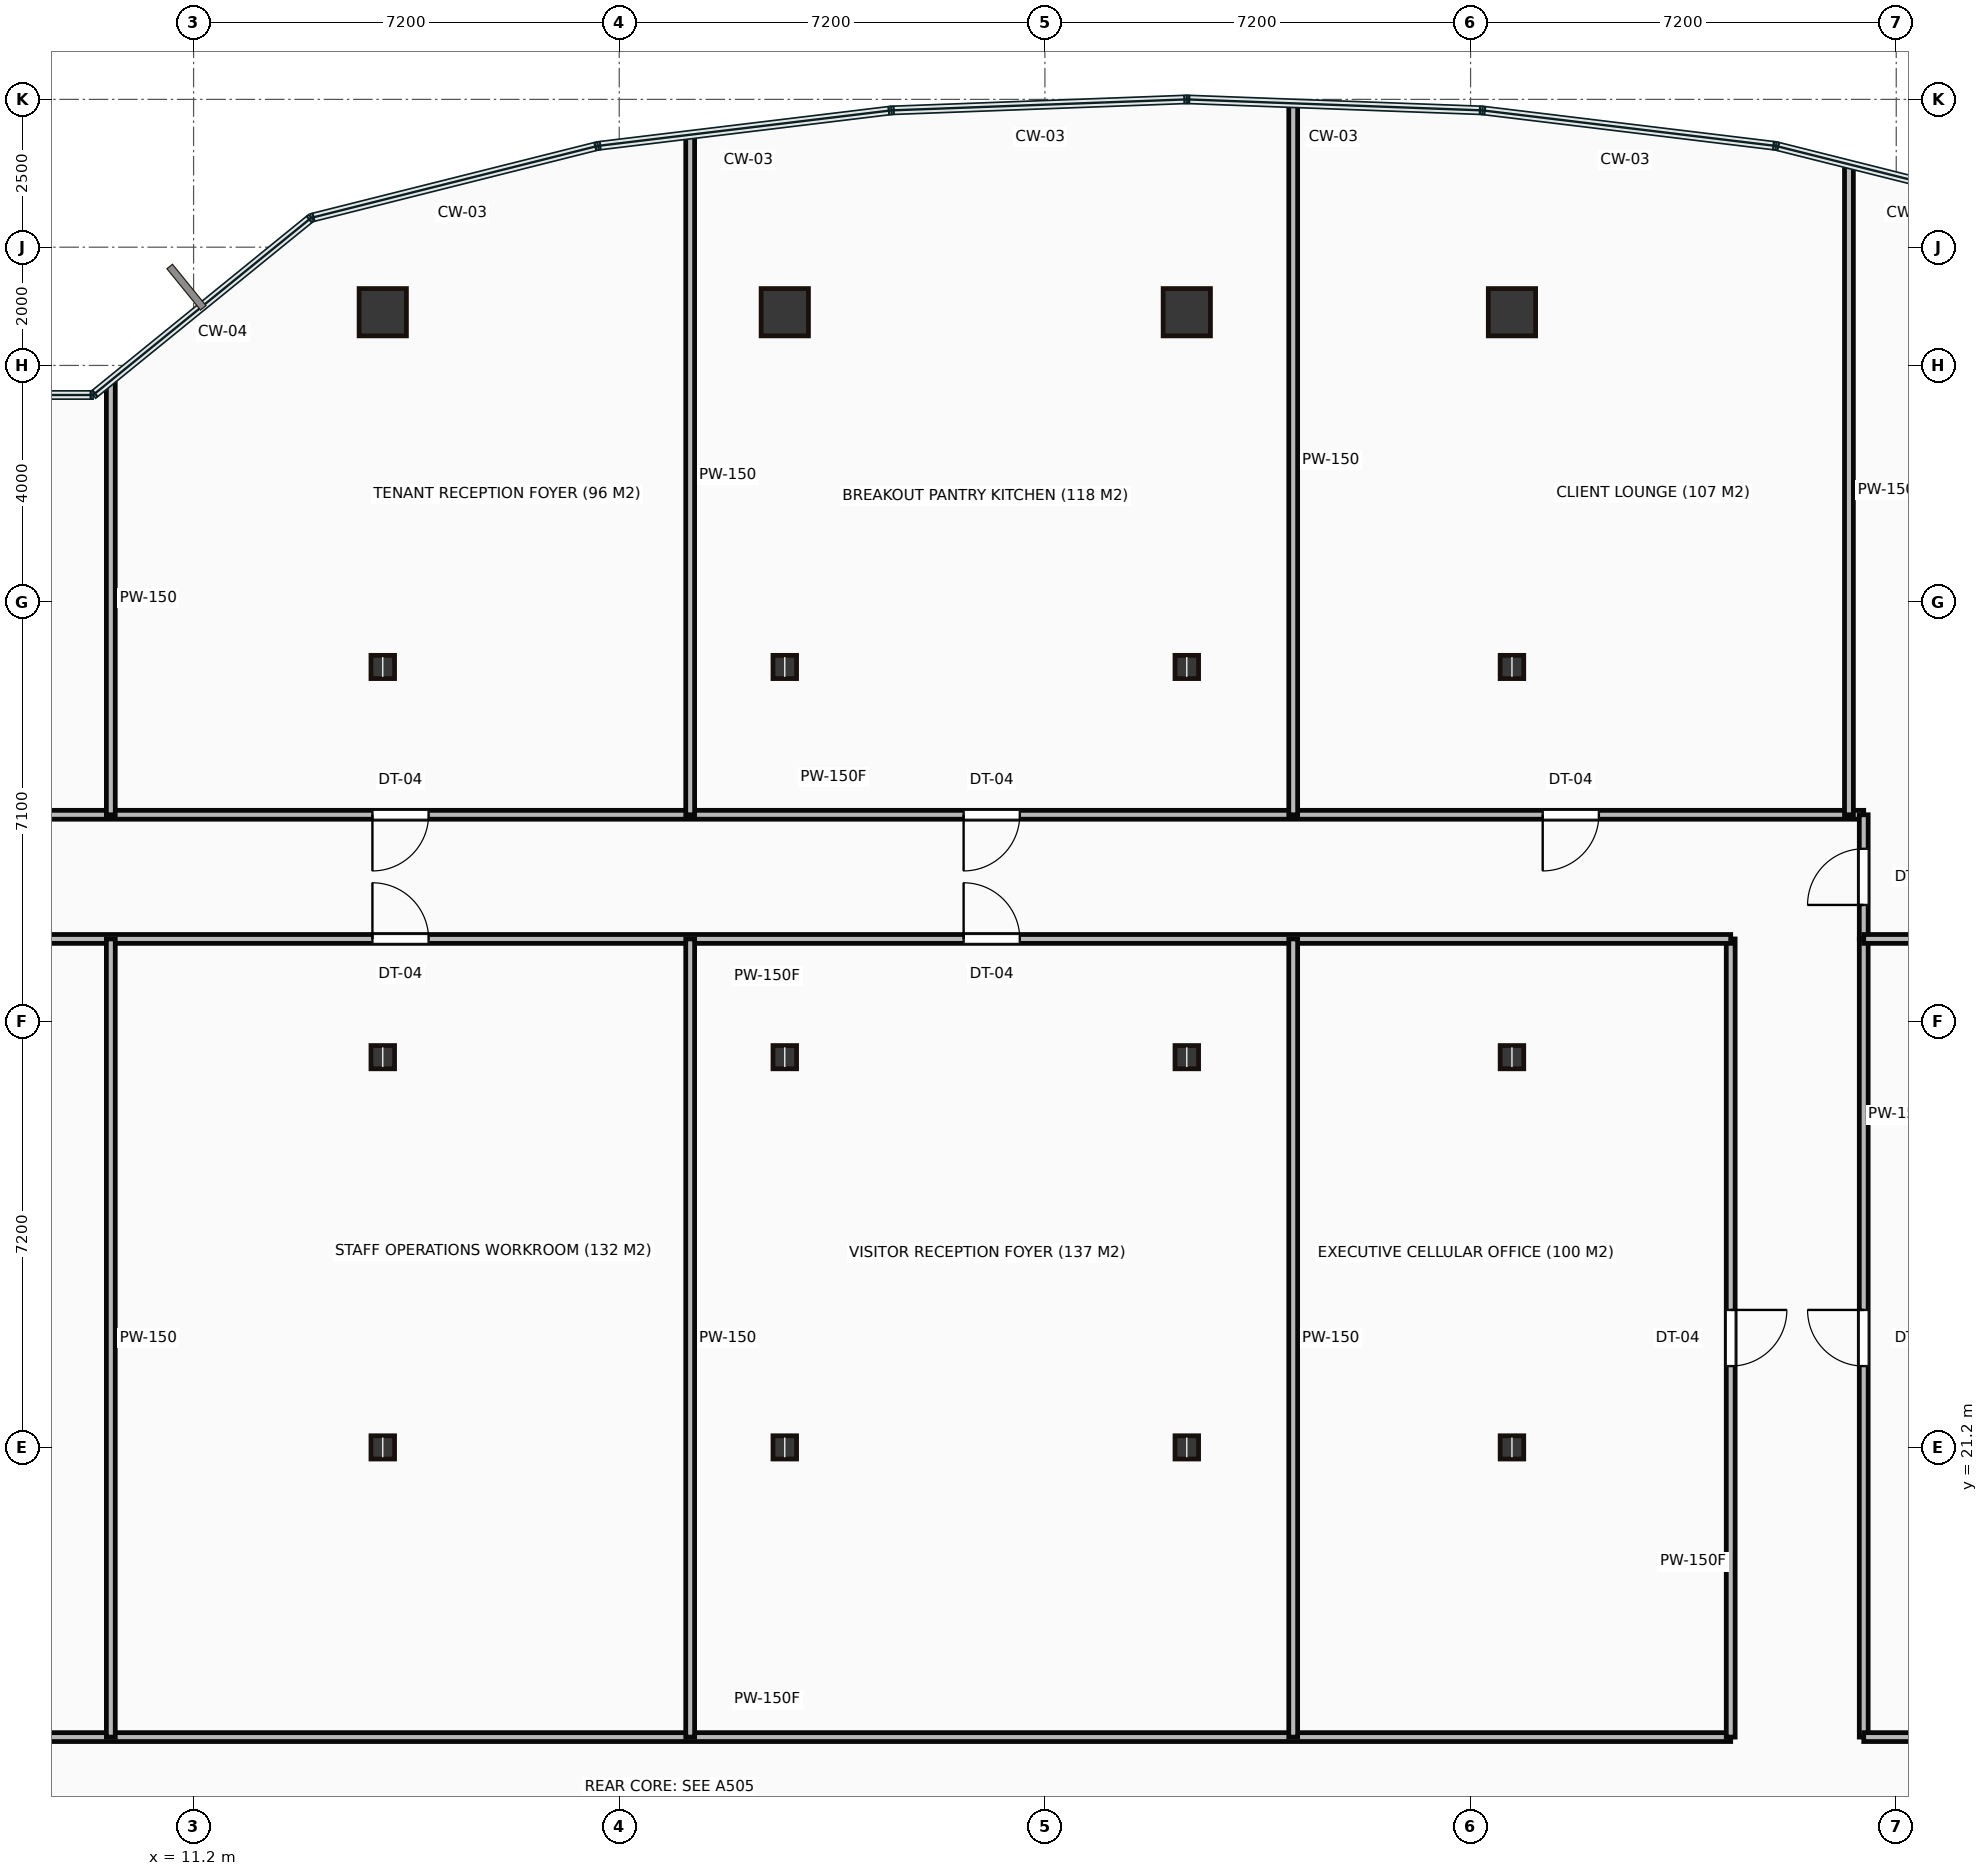
"""IFC4 building model, lengths in metres.
Left out: names, types, materials, properties, quantities, classifications, styles, units other than length and angle.
Written with IfcOpenShell. Run it as: python <this file> out.ifc"""

import sys

from ifc_helpers import new_model, si_unit, direction, frame, frame_2d, origin, origin_2d, place, context, subcontext, project, spatial, rectangle, hollow_rectangle, i_section, extrude, source, transform, mapped, element, fill, save


model = new_model("IFC4")
c1 = context("Model", 3, precision=1e-05, world=origin(), true_north=direction((0.0, 1.0)))
c2 = subcontext(c1, "Body", "Model", "MODEL_VIEW")
j1 = project(units=[si_unit("LENGTHUNIT", "METRE"), si_unit("PLANEANGLEUNIT", "RADIAN")], contexts=[c1])
p1 = place(None, origin())
s1 = spatial("IfcSite", under=j1, at=p1, CompositionType="ELEMENT")
p2 = place(p1, origin())
s2 = spatial("IfcBuilding", under=s1, at=p2, CompositionType="ELEMENT")
p3 = place(p2, frame((0.0, 0.0, 103.25)))
s3 = spatial("IfcBuildingStorey", under=s2, at=p3, CompositionType="ELEMENT", Elevation=103.25)
m1 = source(origin(), c2, "Body", "SweptSolid", [
    extrude(i_section(OverallWidth=0.399, OverallDepth=0.393, WebThickness=0.023, FlangeThickness=0.037, at=origin_2d()), origin(), (0.0, 0.0, 1.0), 3.65),
])
for number, where, z_axis, x_axis in (
    (1, (14.4, 21.2, 0.0), (0.0, 0.0, 1.0), (1.0, 0.0, 0.0)),
    (2, (14.4, 27.8, 0.0), (0.0, 0.0, 1.0), (1.0, 0.0, 0.0)),
    (3, (14.4, 34.4, 0.0), (0.0, 0.0, 1.0), (1.0, 0.0, 0.0)),
):
    element("IfcColumn", number, at=place(p3, frame(where, z_axis=z_axis, x_axis=x_axis)), inside=s3, PredefinedType="COLUMN", context=c2, shape_type="MappedRepresentation", body=[
        mapped(m1, transform((0.0, 0.0, 0.0))),
    ])
m2 = source(origin(), c2, "Body", "SweptSolid", [
    extrude(hollow_rectangle(XDim=0.8, YDim=0.8, WallThickness=0.04, at=origin_2d()), origin(), (0.0, 0.0, 1.0), 3.65),
])
p4 = place(p3, frame((14.4, 40.4, 0.0), z_axis=(0.0, 0.0, 1.0), x_axis=(1.0, 0.0, 0.0)))
e4 = element("IfcColumn", 4, at=p4, inside=s3, PredefinedType="COLUMN", context=c2, shape_type="MappedRepresentation", body=[
    mapped(m2, transform((0.0, 0.0, 0.0))),
])
for number, where, z_axis, x_axis in (
    (5, (21.2, 21.2, 0.0), (0.0, 0.0, 1.0), (1.0, 0.0, 0.0)),
    (6, (21.2, 27.8, 0.0), (0.0, 0.0, 1.0), (1.0, 0.0, 0.0)),
    (7, (21.2, 34.4, 0.0), (0.0, 0.0, 1.0), (1.0, 0.0, 0.0)),
):
    element("IfcColumn", number, at=place(p3, frame(where, z_axis=z_axis, x_axis=x_axis)), inside=s3, PredefinedType="COLUMN", context=c2, shape_type="MappedRepresentation", body=[
        mapped(m1, transform((0.0, 0.0, 0.0))),
    ])
p5 = place(p3, frame((21.2, 40.4, 0.0), z_axis=(0.0, 0.0, 1.0), x_axis=(1.0, 0.0, 0.0)))
e8 = element("IfcColumn", 8, at=p5, inside=s3, PredefinedType="COLUMN", context=c2, shape_type="MappedRepresentation", body=[
    mapped(m2, transform((0.0, 0.0, 0.0))),
])
for number, where, z_axis, x_axis in (
    (9, (28.0, 21.2, 0.0), (0.0, 0.0, 1.0), (1.0, 0.0, 0.0)),
    (10, (28.0, 27.8, 0.0), (0.0, 0.0, 1.0), (1.0, 0.0, 0.0)),
    (11, (28.0, 34.4, 0.0), (0.0, 0.0, 1.0), (1.0, 0.0, 0.0)),
):
    element("IfcColumn", number, at=place(p3, frame(where, z_axis=z_axis, x_axis=x_axis)), inside=s3, PredefinedType="COLUMN", context=c2, shape_type="MappedRepresentation", body=[
        mapped(m1, transform((0.0, 0.0, 0.0))),
    ])
p6 = place(p3, frame((28.0, 40.4, 0.0), z_axis=(0.0, 0.0, 1.0), x_axis=(1.0, 0.0, 0.0)))
e12 = element("IfcColumn", 12, at=p6, inside=s3, PredefinedType="COLUMN", context=c2, shape_type="MappedRepresentation", body=[
    mapped(m2, transform((0.0, 0.0, 0.0))),
])
for number, where, z_axis, x_axis in (
    (13, (33.5, 21.2, 0.0), (0.0, 0.0, 1.0), (1.0, 0.0, 0.0)),
    (14, (33.5, 27.8, 0.0), (0.0, 0.0, 1.0), (1.0, 0.0, 0.0)),
    (15, (33.5, 34.4, 0.0), (0.0, 0.0, 1.0), (1.0, 0.0, 0.0)),
):
    element("IfcColumn", number, at=place(p3, frame(where, z_axis=z_axis, x_axis=x_axis)), inside=s3, PredefinedType="COLUMN", context=c2, shape_type="MappedRepresentation", body=[
        mapped(m1, transform((0.0, 0.0, 0.0))),
    ])
p7 = place(p3, frame((33.5, 40.4, 0.0), z_axis=(0.0, 0.0, 1.0), x_axis=(1.0, 0.0, 0.0)))
e16 = element("IfcColumn", 16, at=p7, inside=s3, PredefinedType="COLUMN", context=c2, shape_type="MappedRepresentation", body=[
    mapped(m2, transform((0.0, 0.0, 0.0))),
])
m3 = source(origin(), c2, "Body", "SweptSolid", [
    extrude(rectangle(XDim=32.6, YDim=0.15, at=frame_2d((16.3, 0.0))), origin(), (0.0, 0.0, 1.0), 3.4),
])
p8 = place(p3, frame((4.6, 16.3, 0.0), z_axis=(0.0, 0.0, 1.0), x_axis=(1.0, 0.0, 0.0)))
e17 = element("IfcWall", 17, at=p8, inside=s3, PredefinedType="PARTITIONING", context=c2, shape_type="MappedRepresentation", body=[
    mapped(m3, transform((0.0, 0.0, 0.0))),
])
p9 = place(p8, frame((2.255, 0.0, 0.0)))
e18 = element("IfcOpeningElement", 18, at=p9, cuts=e17, PredefinedType="OPENING", context=c2, shape_type="SweptSolid", body=[
    extrude(rectangle(XDim=0.95, YDim=2.15, at=frame_2d((0.475, 1.075))), frame((0.0, 0.085, 0.0), z_axis=(0.0, -1.0, 0.0), x_axis=(1.0, 0.0, 0.0)), (0.0, 0.0, 1.0), 0.17),
])
m4 = source(origin(), c2, "Body", "SweptSolid", [
    extrude(rectangle(XDim=13.5, YDim=0.15, at=frame_2d((6.75, 0.0))), origin(), (0.0, 0.0, 1.0), 3.4),
])
p10 = place(p3, frame((37.2, 16.3, 0.0), z_axis=(0.0, 0.0, 1.0), x_axis=(0.0, 1.0, 0.0)))
e19 = element("IfcWall", 19, at=p10, inside=s3, PredefinedType="PARTITIONING", context=c2, shape_type="MappedRepresentation", body=[
    mapped(m4, transform((0.0, 0.0, 0.0))),
])
p11 = place(p10, frame((6.275, 0.0, 0.0)))
e20 = element("IfcOpeningElement", 20, at=p11, cuts=e19, PredefinedType="OPENING", context=c2, shape_type="SweptSolid", body=[
    extrude(rectangle(XDim=0.95, YDim=2.15, at=frame_2d((0.475, 1.075))), frame((0.0, 0.085, 0.0), z_axis=(0.0, -1.0, 0.0), x_axis=(1.0, 0.0, 0.0)), (0.0, 0.0, 1.0), 0.17),
])
p12 = place(p3, frame((37.2, 29.8, 0.0), z_axis=(0.0, 0.0, 1.0), x_axis=(-1.0, 0.0, 0.0)))
e21 = element("IfcWall", 21, at=p12, inside=s3, PredefinedType="PARTITIONING", context=c2, shape_type="MappedRepresentation", body=[
    mapped(m3, transform((0.0, 0.0, 0.0))),
])
p13 = place(p12, frame((22.025, 0.0, 0.0)))
e22 = element("IfcOpeningElement", 22, at=p13, cuts=e21, PredefinedType="OPENING", context=c2, shape_type="SweptSolid", body=[
    extrude(rectangle(XDim=0.95, YDim=2.15, at=frame_2d((0.475, 1.075))), frame((0.0, 0.085, 0.0), z_axis=(0.0, -1.0, 0.0), x_axis=(1.0, 0.0, 0.0)), (0.0, 0.0, 1.0), 0.17),
])
p14 = place(p12, frame((12.025, 0.0, 0.0)))
e23 = element("IfcOpeningElement", 23, at=p14, cuts=e21, PredefinedType="OPENING", context=c2, shape_type="SweptSolid", body=[
    extrude(rectangle(XDim=0.95, YDim=2.15, at=frame_2d((0.475, 1.075))), frame((0.0, 0.085, 0.0), z_axis=(0.0, -1.0, 0.0), x_axis=(1.0, 0.0, 0.0)), (0.0, 0.0, 1.0), 0.17),
])
m5 = source(origin(), c2, "Body", "SweptSolid", [
    extrude(rectangle(XDim=34.85, YDim=0.15, at=frame_2d((17.425, 0.0))), origin(), (0.0, 0.0, 1.0), 3.4),
])
p15 = place(p3, frame((4.6, 31.9, 0.0), z_axis=(0.0, 0.0, 1.0), x_axis=(1.0, 0.0, 0.0)))
e24 = element("IfcWall", 24, at=p15, inside=s3, PredefinedType="PARTITIONING", context=c2, shape_type="MappedRepresentation", body=[
    mapped(m5, transform((0.0, 0.0, 0.0))),
])
p16 = place(p15, frame((2.255, 0.0, 0.0)))
e25 = element("IfcOpeningElement", 25, at=p16, cuts=e24, PredefinedType="OPENING", context=c2, shape_type="SweptSolid", body=[
    extrude(rectangle(XDim=0.95, YDim=2.15, at=frame_2d((0.475, 1.075))), frame((0.0, 0.085, 0.0), z_axis=(0.0, -1.0, 0.0), x_axis=(1.0, 0.0, 0.0)), (0.0, 0.0, 1.0), 0.17),
])
p17 = place(p15, frame((9.625, 0.0, 0.0)))
e26 = element("IfcOpeningElement", 26, at=p17, cuts=e24, PredefinedType="OPENING", context=c2, shape_type="SweptSolid", body=[
    extrude(rectangle(XDim=0.95, YDim=2.15, at=frame_2d((0.475, 1.075))), frame((0.0, 0.085, 0.0), z_axis=(0.0, -1.0, 0.0), x_axis=(1.0, 0.0, 0.0)), (0.0, 0.0, 1.0), 0.17),
])
p18 = place(p15, frame((19.625, 0.0, 0.0)))
e27 = element("IfcOpeningElement", 27, at=p18, cuts=e24, PredefinedType="OPENING", context=c2, shape_type="SweptSolid", body=[
    extrude(rectangle(XDim=0.95, YDim=2.15, at=frame_2d((0.475, 1.075))), frame((0.0, 0.085, 0.0), z_axis=(0.0, -1.0, 0.0), x_axis=(1.0, 0.0, 0.0)), (0.0, 0.0, 1.0), 0.17),
])
p19 = place(p15, frame((29.42, 0.0, 0.0)))
e28 = element("IfcOpeningElement", 28, at=p19, cuts=e24, PredefinedType="OPENING", context=c2, shape_type="SweptSolid", body=[
    extrude(rectangle(XDim=0.95, YDim=2.15, at=frame_2d((0.475, 1.075))), frame((0.0, 0.085, 0.0), z_axis=(0.0, -1.0, 0.0), x_axis=(1.0, 0.0, 0.0)), (0.0, 0.0, 1.0), 0.17),
])
m6 = source(origin(), c2, "Body", "SweptSolid", [
    extrude(rectangle(XDim=2.1, YDim=0.15, at=frame_2d((1.05, 0.0))), origin(), (0.0, 0.0, 1.0), 3.4),
])
p20 = place(p3, frame((39.45, 31.9, 0.0), z_axis=(0.0, 0.0, 1.0), x_axis=(0.0, -1.0, 0.0)))
e29 = element("IfcWall", 29, at=p20, inside=s3, PredefinedType="PARTITIONING", context=c2, shape_type="MappedRepresentation", body=[
    mapped(m6, transform((0.0, 0.0, 0.0))),
])
p21 = place(p20, frame((0.575, 0.0, 0.0)))
e30 = element("IfcOpeningElement", 30, at=p21, cuts=e29, PredefinedType="OPENING", context=c2, shape_type="SweptSolid", body=[
    extrude(rectangle(XDim=0.95, YDim=2.15, at=frame_2d((0.475, 1.075))), frame((0.0, 0.085, 0.0), z_axis=(0.0, -1.0, 0.0), x_axis=(1.0, 0.0, 0.0)), (0.0, 0.0, 1.0), 0.17),
])
p22 = place(p3, frame((39.45, 29.8, 0.0), z_axis=(0.0, 0.0, 1.0), x_axis=(0.0, -1.0, 0.0)))
e31 = element("IfcWall", 31, at=p22, inside=s3, PredefinedType="PARTITIONING", context=c2, shape_type="MappedRepresentation", body=[
    mapped(m4, transform((0.0, 0.0, 0.0))),
])
p23 = place(p22, frame((6.275, 0.0, 0.0)))
e32 = element("IfcOpeningElement", 32, at=p23, cuts=e31, PredefinedType="OPENING", context=c2, shape_type="SweptSolid", body=[
    extrude(rectangle(XDim=0.95, YDim=2.15, at=frame_2d((0.475, 1.075))), frame((0.0, 0.085, 0.0), z_axis=(0.0, -1.0, 0.0), x_axis=(1.0, 0.0, 0.0)), (0.0, 0.0, 1.0), 0.17),
])
m7 = source(origin(), c2, "Body", "SweptSolid", [
    extrude(rectangle(XDim=1.35, YDim=0.15, at=frame_2d((0.675, 0.0))), origin(), (0.0, 0.0, 1.0), 3.4),
])
p24 = place(p3, frame((39.45, 16.3, 0.0), z_axis=(0.0, 0.0, 1.0), x_axis=(1.0, 0.0, 0.0)))
e33 = element("IfcWall", 33, at=p24, inside=s3, PredefinedType="PARTITIONING", context=c2, shape_type="MappedRepresentation", body=[
    mapped(m7, transform((0.0, 0.0, 0.0))),
])
p25 = place(p3, frame((9.8, 29.8, 0.0), z_axis=(0.0, 0.0, 1.0), x_axis=(0.0, -1.0, 0.0)))
e34 = element("IfcWall", 34, at=p25, inside=s3, PredefinedType="PARTITIONING", context=c2, shape_type="MappedRepresentation", body=[
    mapped(m4, transform((0.0, 0.0, 0.0))),
])
m8 = source(origin(), c2, "Body", "SweptSolid", [
    extrude(rectangle(XDim=7.318, YDim=0.15, at=frame_2d((3.659, 0.0))), origin(), (0.0, 0.0, 1.0), 3.4),
])
p26 = place(p3, frame((9.8, 39.218, 0.0), z_axis=(0.0, 0.0, 1.0), x_axis=(0.0, -1.0, 0.0)))
e35 = element("IfcWall", 35, at=p26, inside=s3, PredefinedType="PARTITIONING", context=c2, shape_type="MappedRepresentation", body=[
    mapped(m8, transform((0.0, 0.0, 0.0))),
])
p27 = place(p3, frame((19.6, 29.8, 0.0), z_axis=(0.0, 0.0, 1.0), x_axis=(0.0, -1.0, 0.0)))
e36 = element("IfcWall", 36, at=p27, inside=s3, PredefinedType="PARTITIONING", context=c2, shape_type="MappedRepresentation", body=[
    mapped(m4, transform((0.0, 0.0, 0.0))),
])
m9 = source(origin(), c2, "Body", "SweptSolid", [
    extrude(rectangle(XDim=11.482, YDim=0.15, at=frame_2d((5.741, 0.0))), origin(), (0.0, 0.0, 1.0), 3.4),
])
p28 = place(p3, frame((19.6, 43.382, 0.0), z_axis=(0.0, 0.0, 1.0), x_axis=(0.0, -1.0, 0.0)))
e37 = element("IfcWall", 37, at=p28, inside=s3, PredefinedType="PARTITIONING", context=c2, shape_type="MappedRepresentation", body=[
    mapped(m9, transform((0.0, 0.0, 0.0))),
])
p29 = place(p3, frame((29.8, 29.8, 0.0), z_axis=(0.0, 0.0, 1.0), x_axis=(0.0, -1.0, 0.0)))
e38 = element("IfcWall", 38, at=p29, inside=s3, PredefinedType="PARTITIONING", context=c2, shape_type="MappedRepresentation", body=[
    mapped(m4, transform((0.0, 0.0, 0.0))),
])
m10 = source(origin(), c2, "Body", "SweptSolid", [
    extrude(rectangle(XDim=12.013, YDim=0.15, at=frame_2d((6.007, 0.0))), origin(), (0.0, 0.0, 1.0), 3.4),
])
p30 = place(p3, frame((29.8, 43.913, 0.0), z_axis=(0.0, 0.0, 1.0), x_axis=(0.0, -1.0, 0.0)))
e39 = element("IfcWall", 39, at=p30, inside=s3, PredefinedType="PARTITIONING", context=c2, shape_type="MappedRepresentation", body=[
    mapped(m10, transform((0.0, 0.0, 0.0))),
])
m11 = source(origin(), c2, "Body", "SweptSolid", [
    extrude(rectangle(XDim=10.982, YDim=0.15, at=frame_2d((5.491, 0.0))), origin(), (0.0, 0.0, 1.0), 3.4),
])
p31 = place(p3, frame((39.2, 42.882, 0.0), z_axis=(0.0, 0.0, 1.0), x_axis=(0.0, -1.0, 0.0)))
e40 = element("IfcWall", 40, at=p31, inside=s3, PredefinedType="PARTITIONING", context=c2, shape_type="MappedRepresentation", body=[
    mapped(m11, transform((0.0, 0.0, 0.0))),
])
m12 = source(origin(), c2, "Body", "SweptSolid", [
    extrude(rectangle(XDim=8.35, YDim=0.15, at=frame_2d((4.175, 0.0))), origin(), (0.0, 0.0, 1.0), 3.4),
])
p32 = place(p3, frame((47.8, 29.8, 0.0), z_axis=(0.0, 0.0, 1.0), x_axis=(-1.0, 0.0, 0.0)))
e41 = element("IfcWall", 41, at=p32, inside=s3, PredefinedType="PARTITIONING", context=c2, shape_type="MappedRepresentation", body=[
    mapped(m12, transform((0.0, 0.0, 0.0))),
])
m13 = source(origin(), c2, "Body", "SweptSolid", [
    extrude(rectangle(XDim=0.95, YDim=2.15, at=frame_2d((0.475, 1.075))), frame((0.0, 0.025, 0.0), z_axis=(0.0, -1.0, 0.0), x_axis=(1.0, 0.0, 0.0)), (0.0, 0.0, 1.0), 0.05),
])
p33 = place(p13, origin())
e42 = element("IfcDoor", 42, at=p33, inside=s3, OperationType="SINGLE_SWING_RIGHT", PredefinedType="DOOR", context=c2, shape_type="MappedRepresentation", body=[
    mapped(m13, transform((0.0, 0.0, 0.0))),
])
fill(e22, e42)
p34 = place(p17, origin())
e43 = element("IfcDoor", 43, at=p34, inside=s3, OperationType="SINGLE_SWING_LEFT", PredefinedType="DOOR", context=c2, shape_type="MappedRepresentation", body=[
    mapped(m13, transform((0.0, 0.0, 0.0))),
])
fill(e26, e43)
p35 = place(p14, origin())
e44 = element("IfcDoor", 44, at=p35, inside=s3, OperationType="SINGLE_SWING_RIGHT", PredefinedType="DOOR", context=c2, shape_type="MappedRepresentation", body=[
    mapped(m13, transform((0.0, 0.0, 0.0))),
])
fill(e23, e44)
p36 = place(p18, origin())
e45 = element("IfcDoor", 45, at=p36, inside=s3, OperationType="SINGLE_SWING_LEFT", PredefinedType="DOOR", context=c2, shape_type="MappedRepresentation", body=[
    mapped(m13, transform((0.0, 0.0, 0.0))),
])
fill(e27, e45)
p37 = place(p11, origin())
e46 = element("IfcDoor", 46, at=p37, inside=s3, OperationType="SINGLE_SWING_RIGHT", PredefinedType="DOOR", context=c2, shape_type="MappedRepresentation", body=[
    mapped(m13, transform((0.0, 0.0, 0.0))),
])
fill(e20, e46)
p38 = place(p19, origin())
e47 = element("IfcDoor", 47, at=p38, inside=s3, OperationType="SINGLE_SWING_LEFT", PredefinedType="DOOR", context=c2, shape_type="MappedRepresentation", body=[
    mapped(m13, transform((0.0, 0.0, 0.0))),
])
fill(e28, e47)
p39 = place(p21, origin())
e48 = element("IfcDoor", 48, at=p39, inside=s3, OperationType="SINGLE_SWING_RIGHT", PredefinedType="DOOR", context=c2, shape_type="MappedRepresentation", body=[
    mapped(m13, transform((0.0, 0.0, 0.0))),
])
fill(e30, e48)
p40 = place(p23, origin())
e49 = element("IfcDoor", 49, at=p40, inside=s3, OperationType="SINGLE_SWING_LEFT", PredefinedType="DOOR", context=c2, shape_type="MappedRepresentation", body=[
    mapped(m13, transform((0.0, 0.0, 0.0))),
])
fill(e32, e49)
save(model, sys.argv[1])
